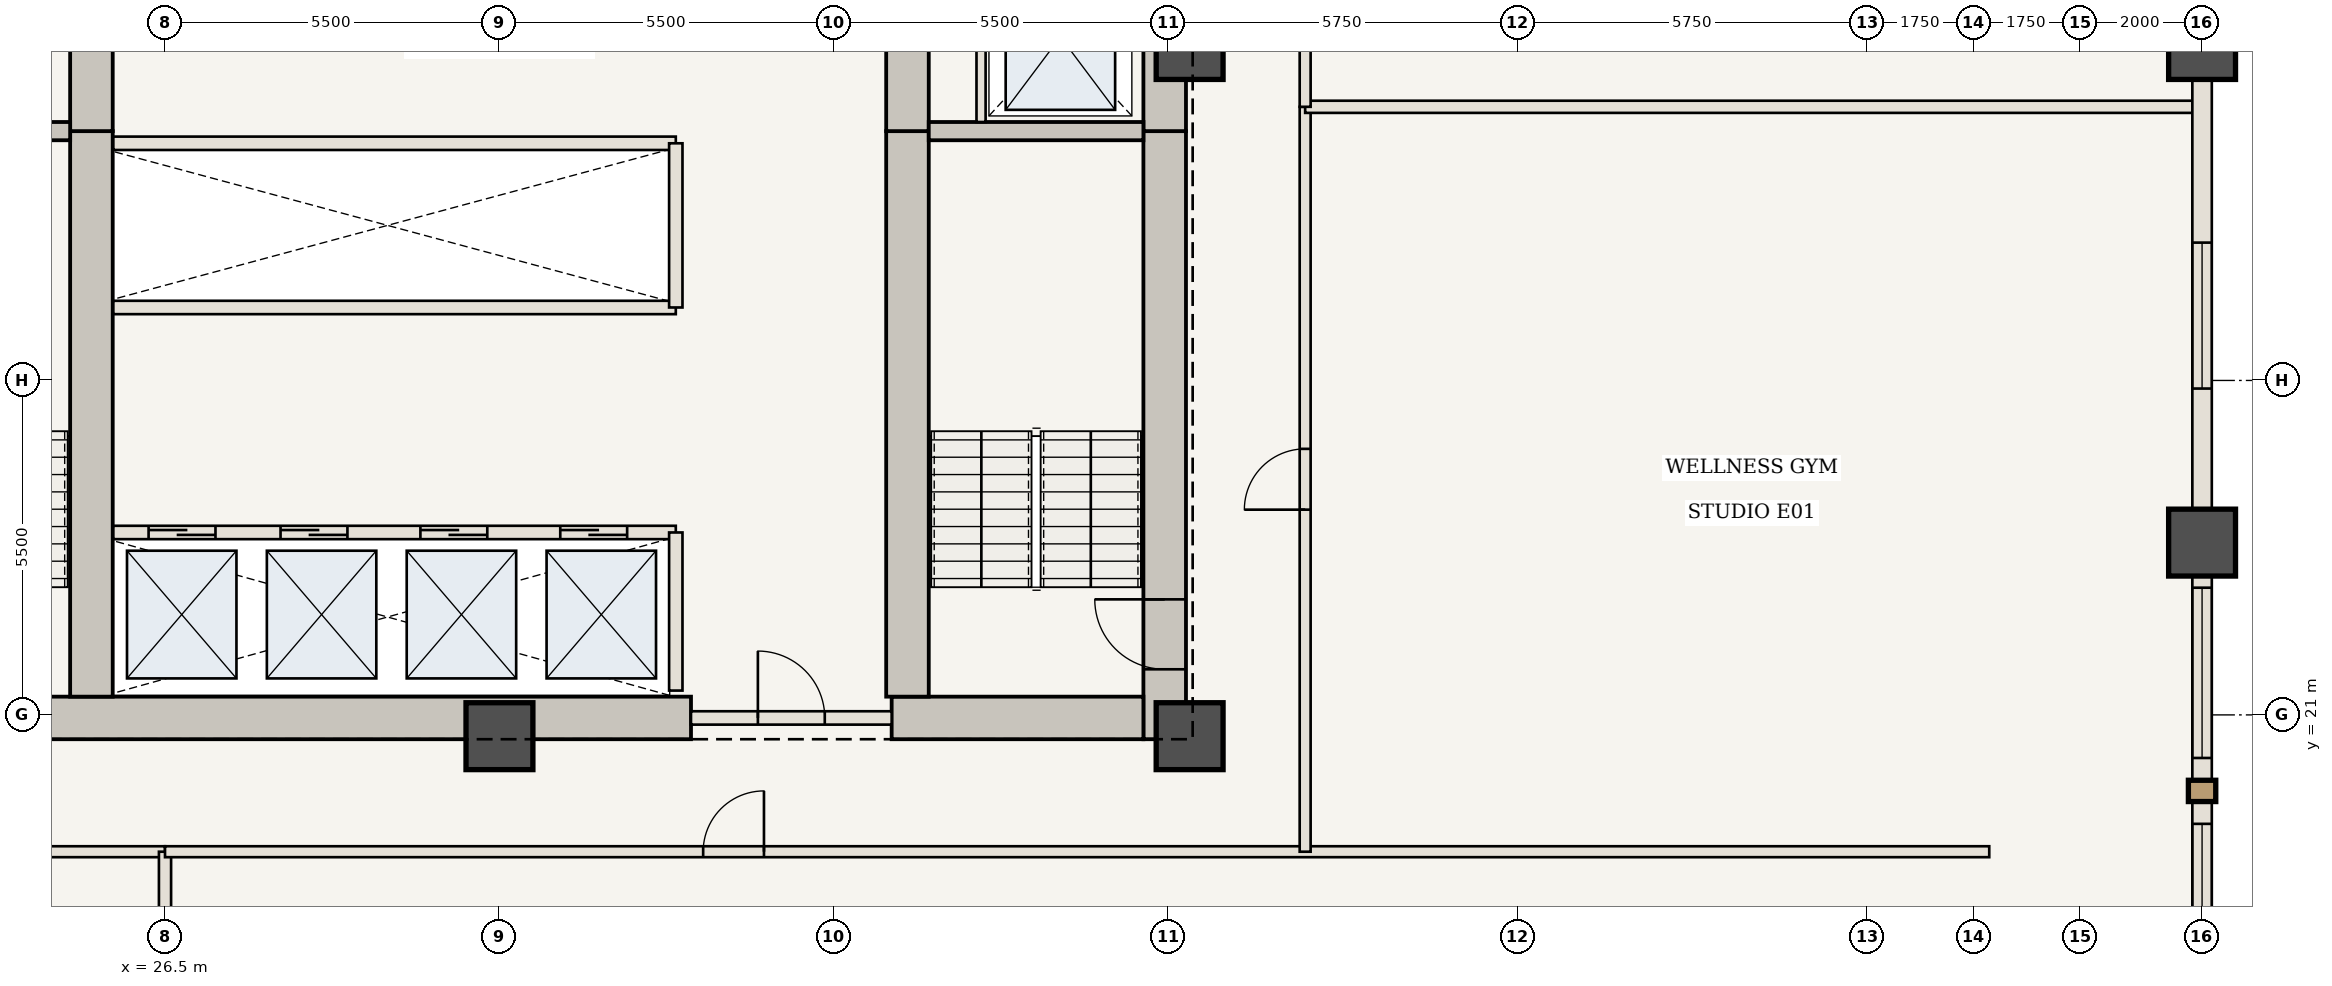
"""IFC4 building model, lengths in metres.
Left out: names, types, materials, properties, quantities, classifications, styles, units other than length and angle.
Written with IfcOpenShell. Run it as: python <this file> out.ifc"""

import sys

from ifc_helpers import new_model, si_unit, direction, frame, frame_2d, origin, origin_2d, place, context, subcontext, project, spatial, rectangle, extrude, element, fill, save


model = new_model("IFC4")
c1 = context("Model", 3, precision=1e-05, world=origin(), true_north=direction((0.0, 1.0)))
c2 = subcontext(c1, "Body", "Model", "MODEL_VIEW")
j1 = project(units=[si_unit("LENGTHUNIT", "METRE"), si_unit("PLANEANGLEUNIT", "RADIAN")], contexts=[c1])
p1 = place(None, origin())
s1 = spatial("IfcSite", under=j1, at=p1, CompositionType="ELEMENT")
p2 = place(p1, origin())
s2 = spatial("IfcBuilding", under=s1, at=p2, CompositionType="ELEMENT")
p3 = place(p2, frame((0.0, 0.0, 82.25)))
s3 = spatial("IfcBuildingStorey", under=s2, at=p3, CompositionType="ELEMENT", Elevation=82.25)
p4 = place(p3, frame((42.94, 20.6, 0.0), z_axis=(0.0, 0.0, 1.0), x_axis=(0.0, 1.0, 0.0)))
e1 = element("IfcWall", 1, at=p4, inside=s3, PredefinedType="SHEAR", context=c2, shape_type="SweptSolid", body=[
    extrude(rectangle(XDim=10.0, YDim=0.7, at=frame_2d((5.0, 0.0))), origin(), (0.0, 0.0, 1.0), 3.5),
])
p5 = place(p4, frame((1.15, 0.0, 0.0)))
e2 = element("IfcOpeningElement", 2, at=p5, cuts=e1, PredefinedType="OPENING", context=c2, shape_type="SweptSolid", body=[
    extrude(rectangle(XDim=1.15, YDim=2.15, at=frame_2d((0.575, 1.075))), frame((0.0, 0.36, 0.0), z_axis=(0.0, -1.0, 0.0), x_axis=(1.0, 0.0, 0.0)), (0.0, 0.0, 1.0), 0.72),
])
p6 = place(p3, frame((42.94, 30.6, 0.0), z_axis=(0.0, 0.0, 1.0), x_axis=(0.0, 1.0, 0.0)))
e3 = element("IfcWall", 3, at=p6, inside=s3, PredefinedType="SHEAR", context=c2, shape_type="SweptSolid", body=[
    extrude(rectangle(XDim=12.75, YDim=0.7, at=frame_2d((6.375, 0.0))), origin(), (0.0, 0.0, 1.0), 3.5),
])
p7 = place(p6, frame((4.2, 0.0, 0.0)))
e4 = element("IfcOpeningElement", 4, at=p7, cuts=e3, PredefinedType="OPENING", context=c2, shape_type="SweptSolid", body=[
    extrude(rectangle(XDim=1.1, YDim=2.15, at=frame_2d((0.55, 1.075))), frame((0.0, 0.36, 0.0), z_axis=(0.0, -1.0, 0.0), x_axis=(1.0, 0.0, 0.0)), (0.0, 0.0, 1.0), 0.72),
])
p8 = place(p6, frame((8.4, 0.0, 0.0)))
e5 = element("IfcOpeningElement", 5, at=p8, cuts=e3, PredefinedType="OPENING", context=c2, shape_type="SweptSolid", body=[
    extrude(rectangle(XDim=0.88, YDim=2.1, at=frame_2d((0.44, 1.05))), frame((0.0, 0.36, 0.0), z_axis=(0.0, -1.0, 0.0), x_axis=(1.0, 0.0, 0.0)), (0.0, 0.0, 1.0), 0.72),
])
p9 = place(p6, frame((10.5, 0.0, 0.0)))
e6 = element("IfcOpeningElement", 6, at=p9, cuts=e3, PredefinedType="OPENING", context=c2, shape_type="SweptSolid", body=[
    extrude(rectangle(XDim=0.88, YDim=2.1, at=frame_2d((0.44, 1.05))), frame((0.0, 0.36, 0.0), z_axis=(0.0, -1.0, 0.0), x_axis=(1.0, 0.0, 0.0)), (0.0, 0.0, 1.0), 0.72),
])
p10 = place(p3, frame((21.41, 20.95, 0.0), z_axis=(0.0, 0.0, 1.0), x_axis=(1.0, 0.0, 0.0)))
e7 = element("IfcWall", 7, at=p10, inside=s3, PredefinedType="SHEAR", context=c2, shape_type="SweptSolid", body=[
    extrude(rectangle(XDim=13.74, YDim=0.7, at=frame_2d((6.87, 0.0))), origin(), (0.0, 0.0, 1.0), 3.5),
])
p11 = place(p3, frame((38.45, 20.95, 0.0), z_axis=(0.0, 0.0, 1.0), x_axis=(1.0, 0.0, 0.0)))
e8 = element("IfcWall", 8, at=p11, inside=s3, PredefinedType="SHEAR", context=c2, shape_type="SweptSolid", body=[
    extrude(rectangle(XDim=4.14, YDim=0.7, at=frame_2d((2.07, 0.0))), origin(), (0.0, 0.0, 1.0), 3.5),
])
p12 = place(p3, frame((25.29, 21.3, 0.0), z_axis=(0.0, 0.0, 1.0), x_axis=(0.0, 1.0, 0.0)))
e9 = element("IfcWall", 9, at=p12, inside=s3, PredefinedType="SHEAR", context=c2, shape_type="SweptSolid", body=[
    extrude(rectangle(XDim=9.3, YDim=0.7, at=frame_2d((4.65, 0.0))), origin(), (0.0, 0.0, 1.0), 3.5),
])
p13 = place(p3, frame((25.29, 30.6, 0.0), z_axis=(0.0, 0.0, 1.0), x_axis=(0.0, 1.0, 0.0)))
e10 = element("IfcWall", 10, at=p13, inside=s3, PredefinedType="SHEAR", context=c2, shape_type="SweptSolid", body=[
    extrude(rectangle(XDim=12.05, YDim=0.7, at=frame_2d((6.025, 0.0))), origin(), (0.0, 0.0, 1.0), 3.5),
])
p14 = place(p13, frame((6.25, 0.0, 0.0)))
e11 = element("IfcOpeningElement", 11, at=p14, cuts=e10, PredefinedType="OPENING", context=c2, shape_type="SweptSolid", body=[
    extrude(rectangle(XDim=1.1, YDim=2.15, at=frame_2d((0.55, 1.075))), frame((0.0, 0.36, 0.0), z_axis=(0.0, -1.0, 0.0), x_axis=(1.0, 0.0, 0.0)), (0.0, 0.0, 1.0), 0.72),
])
p15 = place(p3, frame((38.71, 21.3, 0.0), z_axis=(0.0, 0.0, 1.0), x_axis=(0.0, 1.0, 0.0)))
e12 = element("IfcWall", 12, at=p15, inside=s3, PredefinedType="SHEAR", context=c2, shape_type="SweptSolid", body=[
    extrude(rectangle(XDim=9.3, YDim=0.7, at=frame_2d((4.65, 0.0))), origin(), (0.0, 0.0, 1.0), 3.5),
])
p16 = place(p3, frame((38.71, 30.6, 0.0), z_axis=(0.0, 0.0, 1.0), x_axis=(0.0, 1.0, 0.0)))
e13 = element("IfcWall", 13, at=p16, inside=s3, PredefinedType="SHEAR", context=c2, shape_type="SweptSolid", body=[
    extrude(rectangle(XDim=12.05, YDim=0.7, at=frame_2d((6.025, 0.0))), origin(), (0.0, 0.0, 1.0), 3.5),
])
for number, where, z_axis, x_axis in (
    (14, (32.0, 20.65, 0.0), (0.0, 0.0, 1.0), (1.0, 0.0, 0.0)),
    (15, (43.35, 20.65, 0.0), (0.0, 0.0, 1.0), (1.0, 0.0, 0.0)),
    (16, (43.35, 32.0, 0.0), (0.0, 0.0, 1.0), (1.0, 0.0, 0.0)),
    (17, (60.0, 23.833, 0.0), (0.0, 0.0, 1.0), (1.0, 0.0, 0.0)),
    (18, (60.0, 32.0, 0.0), (0.0, 0.0, 1.0), (1.0, 0.0, 0.0)),
):
    element("IfcColumn", number, at=place(p3, frame(where, z_axis=z_axis, x_axis=x_axis)), inside=s3, PredefinedType="COLUMN", context=c2, shape_type="SweptSolid", body=[
        extrude(rectangle(XDim=1.1, YDim=1.1, at=origin_2d()), origin(), (0.0, 0.0, 1.0), 3.5),
    ])
for number, where, z_axis, x_axis in (
    (19, (21.41, 30.6, 0.0), (0.0, 0.0, 1.0), (1.0, 0.0, 0.0)),
    (20, (39.06, 30.6, 0.0), (0.0, 0.0, 1.0), (1.0, 0.0, 0.0)),
):
    element("IfcWall", number, at=place(p3, frame(where, z_axis=z_axis, x_axis=x_axis)), inside=s3, PredefinedType="SHEAR", context=c2, shape_type="SweptSolid", body=[
        extrude(rectangle(XDim=3.53, YDim=0.3, at=frame_2d((1.765, 0.0))), origin(), (0.0, 0.0, 1.0), 3.32),
    ])
p17 = place(p3, frame((39.92, 30.75, 0.0), z_axis=(0.0, 0.0, 1.0), x_axis=(0.0, 1.0, 0.0)))
e21 = element("IfcWall", 21, at=p17, inside=s3, PredefinedType="STANDARD", context=c2, shape_type="SweptSolid", body=[
    extrude(rectangle(XDim=2.65, YDim=0.15, at=frame_2d((1.325, 0.0))), origin(), (0.0, 0.0, 1.0), 3.32),
])
p18 = place(p3, frame((35.15, 20.95, 0.0), z_axis=(0.0, 0.0, 1.0), x_axis=(1.0, 0.0, 0.0)))
e22 = element("IfcWall", 22, at=p18, inside=s3, PredefinedType="STANDARD", context=c2, shape_type="SweptSolid", body=[
    extrude(rectangle(XDim=3.3, YDim=0.22, at=frame_2d((1.65, 0.0))), origin(), (0.0, 0.0, 1.0), 3.32),
])
p19 = place(p18, frame((1.1, 0.0, 0.0)))
e23 = element("IfcOpeningElement", 23, at=p19, cuts=e22, PredefinedType="OPENING", context=c2, shape_type="SweptSolid", body=[
    extrude(rectangle(XDim=1.1, YDim=2.15, at=frame_2d((0.55, 1.075))), frame((0.0, 0.12, 0.0), z_axis=(0.0, -1.0, 0.0), x_axis=(1.0, 0.0, 0.0)), (0.0, 0.0, 1.0), 0.24),
])
p20 = place(p3, frame((25.65, 24.0, 0.0), z_axis=(0.0, 0.0, 1.0), x_axis=(1.0, 0.0, 0.0)))
e24 = element("IfcWall", 24, at=p20, inside=s3, PredefinedType="STANDARD", context=c2, shape_type="SweptSolid", body=[
    extrude(rectangle(XDim=9.25, YDim=0.22, at=frame_2d((4.625, 0.0))), origin(), (0.0, 0.0, 1.0), 3.32),
])
p21 = place(p20, frame((0.58, 0.0, 0.0)))
e25 = element("IfcOpeningElement", 25, at=p21, cuts=e24, PredefinedType="OPENING", context=c2, shape_type="SweptSolid", body=[
    extrude(rectangle(XDim=1.1, YDim=2.15, at=frame_2d((0.55, 1.075))), frame((0.0, 0.12, 0.0), z_axis=(0.0, -1.0, 0.0), x_axis=(1.0, 0.0, 0.0)), (0.0, 0.0, 1.0), 0.24),
])
p22 = place(p20, frame((2.75, 0.0, 0.0)))
e26 = element("IfcOpeningElement", 26, at=p22, cuts=e24, PredefinedType="OPENING", context=c2, shape_type="SweptSolid", body=[
    extrude(rectangle(XDim=1.1, YDim=2.15, at=frame_2d((0.55, 1.075))), frame((0.0, 0.12, 0.0), z_axis=(0.0, -1.0, 0.0), x_axis=(1.0, 0.0, 0.0)), (0.0, 0.0, 1.0), 0.24),
])
p23 = place(p20, frame((5.05, 0.0, 0.0)))
e27 = element("IfcOpeningElement", 27, at=p23, cuts=e24, PredefinedType="OPENING", context=c2, shape_type="SweptSolid", body=[
    extrude(rectangle(XDim=1.1, YDim=2.15, at=frame_2d((0.55, 1.075))), frame((0.0, 0.12, 0.0), z_axis=(0.0, -1.0, 0.0), x_axis=(1.0, 0.0, 0.0)), (0.0, 0.0, 1.0), 0.24),
])
p24 = place(p20, frame((7.35, 0.0, 0.0)))
e28 = element("IfcOpeningElement", 28, at=p24, cuts=e24, PredefinedType="OPENING", context=c2, shape_type="SweptSolid", body=[
    extrude(rectangle(XDim=1.1, YDim=2.15, at=frame_2d((0.55, 1.075))), frame((0.0, 0.12, 0.0), z_axis=(0.0, -1.0, 0.0), x_axis=(1.0, 0.0, 0.0)), (0.0, 0.0, 1.0), 0.24),
])
p25 = place(p3, frame((34.9, 21.4, 0.0), z_axis=(0.0, 0.0, 1.0), x_axis=(0.0, 1.0, 0.0)))
e29 = element("IfcWall", 29, at=p25, inside=s3, PredefinedType="STANDARD", context=c2, shape_type="SweptSolid", body=[
    extrude(rectangle(XDim=2.6, YDim=0.22, at=frame_2d((1.3, 0.0))), origin(), (0.0, 0.0, 1.0), 3.32),
])
for number, where, z_axis, x_axis in (
    (30, (25.65, 27.7, 0.0), (0.0, 0.0, 1.0), (1.0, 0.0, 0.0)),
    (31, (25.65, 30.4, 0.0), (0.0, 0.0, 1.0), (1.0, 0.0, 0.0)),
):
    element("IfcWall", number, at=place(p3, frame(where, z_axis=z_axis, x_axis=x_axis)), inside=s3, PredefinedType="STANDARD", context=c2, shape_type="SweptSolid", body=[
        extrude(rectangle(XDim=9.25, YDim=0.22, at=frame_2d((4.625, 0.0))), origin(), (0.0, 0.0, 1.0), 3.32),
    ])
p26 = place(p3, frame((34.9, 27.7, 0.0), z_axis=(0.0, 0.0, 1.0), x_axis=(0.0, 1.0, 0.0)))
e32 = element("IfcWall", 32, at=p26, inside=s3, PredefinedType="STANDARD", context=c2, shape_type="SweptSolid", body=[
    extrude(rectangle(XDim=2.7, YDim=0.22, at=frame_2d((1.35, 0.0))), origin(), (0.0, 0.0, 1.0), 3.32),
])
p27 = place(p3, frame((7.5, 18.75, 0.0), z_axis=(0.0, 0.0, 1.0), x_axis=(1.0, 0.0, 0.0)))
e33 = element("IfcWall", 33, at=p27, inside=s3, PredefinedType="STANDARD", context=c2, shape_type="SweptSolid", body=[
    extrude(rectangle(XDim=19.0, YDim=0.18, at=frame_2d((9.5, 0.0))), origin(), (0.0, 0.0, 1.0), 3.32),
])
p28 = place(p27, frame((14.65, 0.0, 0.0)))
e34 = element("IfcOpeningElement", 34, at=p28, cuts=e33, PredefinedType="OPENING", context=c2, shape_type="SweptSolid", body=[
    extrude(rectangle(XDim=1.0, YDim=2.15, at=frame_2d((0.5, 1.075))), frame((0.0, 0.1, 0.0), z_axis=(0.0, -1.0, 0.0), x_axis=(1.0, 0.0, 0.0)), (0.0, 0.0, 1.0), 0.2),
])
p29 = place(p3, frame((26.5, 4.06, 0.0), z_axis=(0.0, 0.0, 1.0), x_axis=(0.0, 1.0, 0.0)))
e35 = element("IfcWall", 35, at=p29, inside=s3, PredefinedType="STANDARD", context=c2, shape_type="SweptSolid", body=[
    extrude(rectangle(XDim=14.69, YDim=0.2, at=frame_2d((7.345, 0.0))), origin(), (0.0, 0.0, 1.0), 3.32),
])
p30 = place(p3, frame((26.5, 18.75, 0.0), z_axis=(0.0, 0.0, 1.0), x_axis=(1.0, 0.0, 0.0)))
e36 = element("IfcWall", 36, at=p30, inside=s3, PredefinedType="STANDARD", context=c2, shape_type="SweptSolid", body=[
    extrude(rectangle(XDim=30.0, YDim=0.18, at=frame_2d((15.0, 0.0))), origin(), (0.0, 0.0, 1.0), 3.32),
])
p31 = place(p30, frame((8.85, 0.0, 0.0)))
e37 = element("IfcOpeningElement", 37, at=p31, cuts=e36, PredefinedType="OPENING", context=c2, shape_type="SweptSolid", body=[
    extrude(rectangle(XDim=1.0, YDim=2.15, at=frame_2d((0.5, 1.075))), frame((0.0, 0.1, 0.0), z_axis=(0.0, -1.0, 0.0), x_axis=(1.0, 0.0, 0.0)), (0.0, 0.0, 1.0), 0.2),
])
p32 = place(p3, frame((45.25, 18.75, 0.0), z_axis=(0.0, 0.0, 1.0), x_axis=(0.0, 1.0, 0.0)))
e38 = element("IfcWall", 38, at=p32, inside=s3, PredefinedType="STANDARD", context=c2, shape_type="SweptSolid", body=[
    extrude(rectangle(XDim=12.25, YDim=0.18, at=frame_2d((6.125, 0.0))), origin(), (0.0, 0.0, 1.0), 3.32),
])
p33 = place(p32, frame((5.625, 0.0, 0.0)))
e39 = element("IfcOpeningElement", 39, at=p33, cuts=e38, PredefinedType="OPENING", context=c2, shape_type="SweptSolid", body=[
    extrude(rectangle(XDim=1.0, YDim=2.15, at=frame_2d((0.5, 1.075))), frame((0.0, 0.1, 0.0), z_axis=(0.0, -1.0, 0.0), x_axis=(1.0, 0.0, 0.0)), (0.0, 0.0, 1.0), 0.2),
])
p34 = place(p3, frame((45.25, 31.0, 0.0), z_axis=(0.0, 0.0, 1.0), x_axis=(1.0, 0.0, 0.0)))
e40 = element("IfcWall", 40, at=p34, inside=s3, PredefinedType="STANDARD", context=c2, shape_type="SweptSolid", body=[
    extrude(rectangle(XDim=14.69, YDim=0.2, at=frame_2d((7.345, 0.0))), origin(), (0.0, 0.0, 1.0), 3.32),
])
p35 = place(p3, frame((45.25, 31.0, 0.0), z_axis=(0.0, 0.0, 1.0), x_axis=(0.0, 1.0, 0.0)))
e41 = element("IfcWall", 41, at=p35, inside=s3, PredefinedType="STANDARD", context=c2, shape_type="SweptSolid", body=[
    extrude(rectangle(XDim=14.25, YDim=0.18, at=frame_2d((7.125, 0.0))), origin(), (0.0, 0.0, 1.0), 3.32),
])
p36 = place(p35, frame((6.625, 0.0, 0.0)))
e42 = element("IfcOpeningElement", 42, at=p36, cuts=e41, PredefinedType="OPENING", context=c2, shape_type="SweptSolid", body=[
    extrude(rectangle(XDim=1.0, YDim=2.15, at=frame_2d((0.5, 1.075))), frame((0.0, 0.1, 0.0), z_axis=(0.0, -1.0, 0.0), x_axis=(1.0, 0.0, 0.0)), (0.0, 0.0, 1.0), 0.2),
])
p37 = place(p3, frame((60.0, 23.833, 0.0), z_axis=(0.0, 0.0, 1.0), x_axis=(0.0, -1.0, 0.0)))
e43 = element("IfcWall", 43, at=p37, inside=s3, PredefinedType="USERDEFINED", context=c2, shape_type="SweptSolid", body=[
    extrude(rectangle(XDim=8.167, YDim=0.32, at=frame_2d((4.083, 0.0))), origin(), (0.0, 0.0, 1.0), 2.52),
])
p38 = place(p37, frame((0.742, 0.0, 0.85)))
e44 = element("IfcOpeningElement", 44, at=p38, cuts=e43, PredefinedType="OPENING", context=c2, shape_type="SweptSolid", body=[
    extrude(rectangle(XDim=2.8, YDim=1.47, at=frame_2d((1.4, 0.735))), frame((0.0, 0.17, 0.0), z_axis=(0.0, -1.0, 0.0), x_axis=(1.0, 0.0, 0.0)), (0.0, 0.0, 1.0), 0.34),
])
p39 = place(p37, frame((4.625, 0.0, 0.85)))
e45 = element("IfcOpeningElement", 45, at=p39, cuts=e43, PredefinedType="OPENING", context=c2, shape_type="SweptSolid", body=[
    extrude(rectangle(XDim=2.8, YDim=1.47, at=frame_2d((1.4, 0.735))), frame((0.0, 0.17, 0.0), z_axis=(0.0, -1.0, 0.0), x_axis=(1.0, 0.0, 0.0)), (0.0, 0.0, 1.0), 0.34),
])
p40 = place(p3, frame((60.0, 32.0, 0.0), z_axis=(0.0, 0.0, 1.0), x_axis=(0.0, -1.0, 0.0)))
e46 = element("IfcWall", 46, at=p40, inside=s3, PredefinedType="USERDEFINED", context=c2, shape_type="SweptSolid", body=[
    extrude(rectangle(XDim=8.167, YDim=0.32, at=frame_2d((4.083, 0.0))), origin(), (0.0, 0.0, 1.0), 2.52),
])
p41 = place(p40, frame((3.233, 0.0, 0.85)))
e47 = element("IfcOpeningElement", 47, at=p41, cuts=e46, PredefinedType="OPENING", context=c2, shape_type="SweptSolid", body=[
    extrude(rectangle(XDim=2.4, YDim=1.47, at=frame_2d((1.2, 0.735))), frame((0.0, 0.17, 0.0), z_axis=(0.0, -1.0, 0.0), x_axis=(1.0, 0.0, 0.0)), (0.0, 0.0, 1.0), 0.34),
])
p42 = place(p5, origin())
e48 = element("IfcDoor", 48, at=p42, inside=s3, OperationType="SINGLE_SWING_RIGHT", PredefinedType="DOOR", context=c2, shape_type="SweptSolid", body=[
    extrude(rectangle(XDim=1.15, YDim=2.15, at=frame_2d((0.575, 1.075))), frame((0.0, 0.025, 0.0), z_axis=(0.0, -1.0, 0.0), x_axis=(1.0, 0.0, 0.0)), (0.0, 0.0, 1.0), 0.05),
])
fill(e2, e48)
p43 = place(p19, origin())
e49 = element("IfcDoor", 49, at=p43, inside=s3, OperationType="SINGLE_SWING_LEFT", PredefinedType="DOOR", context=c2, shape_type="SweptSolid", body=[
    extrude(rectangle(XDim=1.1, YDim=2.15, at=frame_2d((0.55, 1.075))), frame((0.0, 0.025, 0.0), z_axis=(0.0, -1.0, 0.0), x_axis=(1.0, 0.0, 0.0)), (0.0, 0.0, 1.0), 0.05),
])
fill(e23, e49)
p44 = place(p21, origin())
e50 = element("IfcDoor", 50, at=p44, inside=s3, OperationType="DOUBLE_DOOR_SLIDING", PredefinedType="DOOR", context=c2, shape_type="SweptSolid", body=[
    extrude(rectangle(XDim=1.1, YDim=2.15, at=frame_2d((0.55, 1.075))), frame((0.0, 0.025, 0.0), z_axis=(0.0, -1.0, 0.0), x_axis=(1.0, 0.0, 0.0)), (0.0, 0.0, 1.0), 0.05),
])
fill(e25, e50)
p45 = place(p22, origin())
e51 = element("IfcDoor", 51, at=p45, inside=s3, OperationType="DOUBLE_DOOR_SLIDING", PredefinedType="DOOR", context=c2, shape_type="SweptSolid", body=[
    extrude(rectangle(XDim=1.1, YDim=2.15, at=frame_2d((0.55, 1.075))), frame((0.0, 0.025, 0.0), z_axis=(0.0, -1.0, 0.0), x_axis=(1.0, 0.0, 0.0)), (0.0, 0.0, 1.0), 0.05),
])
fill(e26, e51)
p46 = place(p23, origin())
e52 = element("IfcDoor", 52, at=p46, inside=s3, OperationType="DOUBLE_DOOR_SLIDING", PredefinedType="DOOR", context=c2, shape_type="SweptSolid", body=[
    extrude(rectangle(XDim=1.1, YDim=2.15, at=frame_2d((0.55, 1.075))), frame((0.0, 0.025, 0.0), z_axis=(0.0, -1.0, 0.0), x_axis=(1.0, 0.0, 0.0)), (0.0, 0.0, 1.0), 0.05),
])
fill(e27, e52)
p47 = place(p24, origin())
e53 = element("IfcDoor", 53, at=p47, inside=s3, OperationType="DOUBLE_DOOR_SLIDING", PredefinedType="DOOR", context=c2, shape_type="SweptSolid", body=[
    extrude(rectangle(XDim=1.1, YDim=2.15, at=frame_2d((0.55, 1.075))), frame((0.0, 0.025, 0.0), z_axis=(0.0, -1.0, 0.0), x_axis=(1.0, 0.0, 0.0)), (0.0, 0.0, 1.0), 0.05),
])
fill(e28, e53)
p48 = place(p31, origin())
e54 = element("IfcDoor", 54, at=p48, inside=s3, OperationType="SINGLE_SWING_RIGHT", PredefinedType="DOOR", context=c2, shape_type="SweptSolid", body=[
    extrude(rectangle(XDim=1.0, YDim=2.15, at=frame_2d((0.5, 1.075))), frame((0.0, 0.025, 0.0), z_axis=(0.0, -1.0, 0.0), x_axis=(1.0, 0.0, 0.0)), (0.0, 0.0, 1.0), 0.05),
])
fill(e37, e54)
p49 = place(p33, origin())
e55 = element("IfcDoor", 55, at=p49, inside=s3, OperationType="SINGLE_SWING_LEFT", PredefinedType="DOOR", context=c2, shape_type="SweptSolid", body=[
    extrude(rectangle(XDim=1.0, YDim=2.15, at=frame_2d((0.5, 1.075))), frame((0.0, 0.025, 0.0), z_axis=(0.0, -1.0, 0.0), x_axis=(1.0, 0.0, 0.0)), (0.0, 0.0, 1.0), 0.05),
])
fill(e39, e55)
p50 = place(p38, origin())
e56 = element("IfcWindow", 56, at=p50, inside=s3, PartitioningType="SINGLE_PANEL", PredefinedType="WINDOW", context=c2, shape_type="SweptSolid", body=[
    extrude(rectangle(XDim=2.8, YDim=1.47, at=frame_2d((1.4, 0.735))), frame((0.0, 0.03, 0.0), z_axis=(0.0, -1.0, 0.0), x_axis=(1.0, 0.0, 0.0)), (0.0, 0.0, 1.0), 0.06),
])
fill(e44, e56)
p51 = place(p39, origin())
e57 = element("IfcWindow", 57, at=p51, inside=s3, PartitioningType="SINGLE_PANEL", PredefinedType="WINDOW", context=c2, shape_type="SweptSolid", body=[
    extrude(rectangle(XDim=2.8, YDim=1.47, at=frame_2d((1.4, 0.735))), frame((0.0, 0.03, 0.0), z_axis=(0.0, -1.0, 0.0), x_axis=(1.0, 0.0, 0.0)), (0.0, 0.0, 1.0), 0.06),
])
fill(e45, e57)
p52 = place(p41, origin())
e58 = element("IfcWindow", 58, at=p52, inside=s3, PartitioningType="SINGLE_PANEL", PredefinedType="WINDOW", context=c2, shape_type="SweptSolid", body=[
    extrude(rectangle(XDim=2.4, YDim=1.47, at=frame_2d((1.2, 0.735))), frame((0.0, 0.03, 0.0), z_axis=(0.0, -1.0, 0.0), x_axis=(1.0, 0.0, 0.0)), (0.0, 0.0, 1.0), 0.06),
])
fill(e47, e58)
save(model, sys.argv[1])
